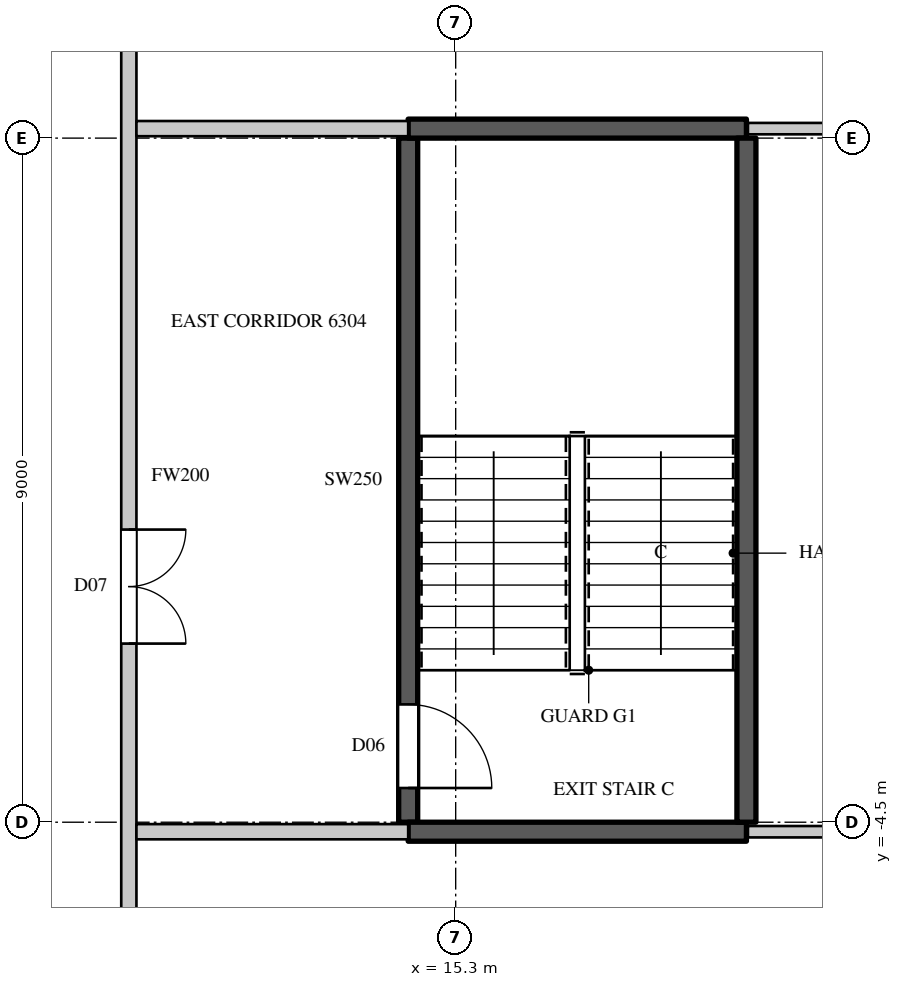
"""IFC4 building model, lengths in metres.
Left out: names, types, materials, properties, quantities, classifications, styles, units other than length and angle.
Written with IfcOpenShell. Run it as: python <this file> out.ifc"""

import sys

from ifc_helpers import new_model, si_unit, direction, frame, frame_2d, origin, place, context, subcontext, project, spatial, rectangle, extrude, element, fill, save


model = new_model("IFC4")
c1 = context("Model", 3, precision=1e-05, world=origin(), true_north=direction((0.0, 1.0)))
c2 = subcontext(c1, "Body", "Model", "MODEL_VIEW")
j1 = project(units=[si_unit("LENGTHUNIT", "METRE"), si_unit("PLANEANGLEUNIT", "RADIAN")], contexts=[c1])
p1 = place(None, origin())
s1 = spatial("IfcSite", under=j1, at=p1, CompositionType="ELEMENT")
p2 = place(p1, origin())
s2 = spatial("IfcBuilding", under=s1, at=p2, CompositionType="ELEMENT")
p3 = place(p2, frame((0.0, 0.0, 280.3)))
s3 = spatial("IfcBuildingStorey", under=s2, at=p3, CompositionType="ELEMENT", Elevation=280.3)
p4 = place(p3, frame((11.0, -12.0, 0.0), z_axis=(0.0, 0.0, 1.0), x_axis=(0.0, 1.0, 0.0)))
e1 = element("IfcWall", 1, at=p4, inside=s3, PredefinedType="PARTITIONING", context=c2, shape_type="SweptSolid", body=[
    extrude(rectangle(XDim=24.1, YDim=0.2, at=frame_2d((12.05, 0.0))), origin(), (0.0, 0.0, 1.0), 3.8),
])
p5 = place(p4, frame((9.85, 0.0, 0.0)))
e2 = element("IfcOpeningElement", 2, at=p5, cuts=e1, PredefinedType="OPENING", context=c2, shape_type="SweptSolid", body=[
    extrude(rectangle(XDim=1.5, YDim=2.4, at=frame_2d((0.75, 1.2))), frame((0.0, 0.11, 0.0), z_axis=(0.0, -1.0, 0.0), x_axis=(1.0, 0.0, 0.0)), (0.0, 0.0, 1.0), 0.22),
])
p6 = place(p4, frame((4.55, 0.0, 0.0)))
e3 = element("IfcOpeningElement", 3, at=p6, cuts=e1, PredefinedType="OPENING", context=c2, shape_type="SweptSolid", body=[
    extrude(rectangle(XDim=1.1, YDim=2.4, at=frame_2d((0.55, 1.2))), frame((0.0, 0.11, 0.0), z_axis=(0.0, -1.0, 0.0), x_axis=(1.0, 0.0, 0.0)), (0.0, 0.0, 1.0), 0.22),
])
for number, where, z_axis, x_axis in (
    (4, (11.1, -4.625, 0.0), (0.0, 0.0, 1.0), (1.0, 0.0, 0.0)),
    (5, (11.1, 4.625, 0.0), (0.0, 0.0, 1.0), (1.0, 0.0, 0.0)),
):
    element("IfcWall", number, at=place(p3, frame(where, z_axis=z_axis, x_axis=x_axis)), inside=s3, PredefinedType="PARTITIONING", context=c2, shape_type="SweptSolid", body=[
        extrude(rectangle(XDim=3.575, YDim=0.2, at=frame_2d((1.788, 0.0))), origin(), (0.0, 0.0, 1.0), 3.8),
    ])
for number, where, z_axis, x_axis in (
    (6, (19.145, -4.625, 0.0), (0.0, 0.0, 1.0), (1.0, 0.0, 0.0)),
    (7, (19.145, 4.625, 0.0), (0.0, 0.0, 1.0), (1.0, 0.0, 0.0)),
):
    element("IfcWall", number, at=place(p3, frame(where, z_axis=z_axis, x_axis=x_axis)), inside=s3, PredefinedType="PARTITIONING", context=c2, shape_type="SweptSolid", body=[
        extrude(rectangle(XDim=4.605, YDim=0.15, at=frame_2d((2.302, 0.0))), origin(), (0.0, 0.0, 1.0), 3.8),
    ])
p7 = place(p3, frame((14.675, -4.5, 0.0), z_axis=(0.0, 0.0, 1.0), x_axis=(0.0, 1.0, 0.0)))
e8 = element("IfcWall", 8, at=p7, inside=s3, PredefinedType="SHEAR", context=c2, shape_type="SweptSolid", body=[
    extrude(rectangle(XDim=9.0, YDim=0.25, at=frame_2d((4.5, 0.0))), origin(), (0.0, 0.0, 1.0), 3.8),
])
p8 = place(p7, frame((0.45, 0.0, 0.0)))
e9 = element("IfcOpeningElement", 9, at=p8, cuts=e8, PredefinedType="OPENING", context=c2, shape_type="SweptSolid", body=[
    extrude(rectangle(XDim=1.1, YDim=2.2, at=frame_2d((0.55, 1.1))), frame((0.0, 0.135, 0.0), z_axis=(0.0, -1.0, 0.0), x_axis=(1.0, 0.0, 0.0)), (0.0, 0.0, 1.0), 0.27),
])
for number, where, z_axis, x_axis in (
    (10, (14.675, -4.625, 0.0), (0.0, 0.0, 1.0), (1.0, 0.0, 0.0)),
    (11, (14.675, 4.625, 0.0), (0.0, 0.0, 1.0), (1.0, 0.0, 0.0)),
):
    element("IfcWall", number, at=place(p3, frame(where, z_axis=z_axis, x_axis=x_axis)), inside=s3, PredefinedType="SHEAR", context=c2, shape_type="SweptSolid", body=[
        extrude(rectangle(XDim=4.45, YDim=0.25, at=frame_2d((2.225, 0.0))), origin(), (0.0, 0.0, 1.0), 3.8),
    ])
p9 = place(p3, frame((19.125, -4.5, 0.0), z_axis=(0.0, 0.0, 1.0), x_axis=(0.0, 1.0, 0.0)))
e12 = element("IfcWall", 12, at=p9, inside=s3, PredefinedType="SHEAR", context=c2, shape_type="SweptSolid", body=[
    extrude(rectangle(XDim=9.0, YDim=0.25, at=frame_2d((4.5, 0.0))), origin(), (0.0, 0.0, 1.0), 3.8),
])
p10 = place(p5, origin())
e13 = element("IfcDoor", 13, at=p10, inside=s3, OperationType="DOUBLE_DOOR_SINGLE_SWING", PredefinedType="DOOR", context=c2, shape_type="SweptSolid", body=[
    extrude(rectangle(XDim=1.5, YDim=2.4, at=frame_2d((0.75, 1.2))), frame((0.0, 0.025, 0.0), z_axis=(0.0, -1.0, 0.0), x_axis=(1.0, 0.0, 0.0)), (0.0, 0.0, 1.0), 0.05),
])
fill(e2, e13)
p11 = place(p8, origin())
e14 = element("IfcDoor", 14, at=p11, inside=s3, OperationType="SINGLE_SWING_RIGHT", PredefinedType="DOOR", context=c2, shape_type="SweptSolid", body=[
    extrude(rectangle(XDim=1.1, YDim=2.2, at=frame_2d((0.55, 1.1))), frame((0.0, 0.025, 0.0), z_axis=(0.0, -1.0, 0.0), x_axis=(1.0, 0.0, 0.0)), (0.0, 0.0, 1.0), 0.05),
])
fill(e9, e14)
save(model, sys.argv[1])
